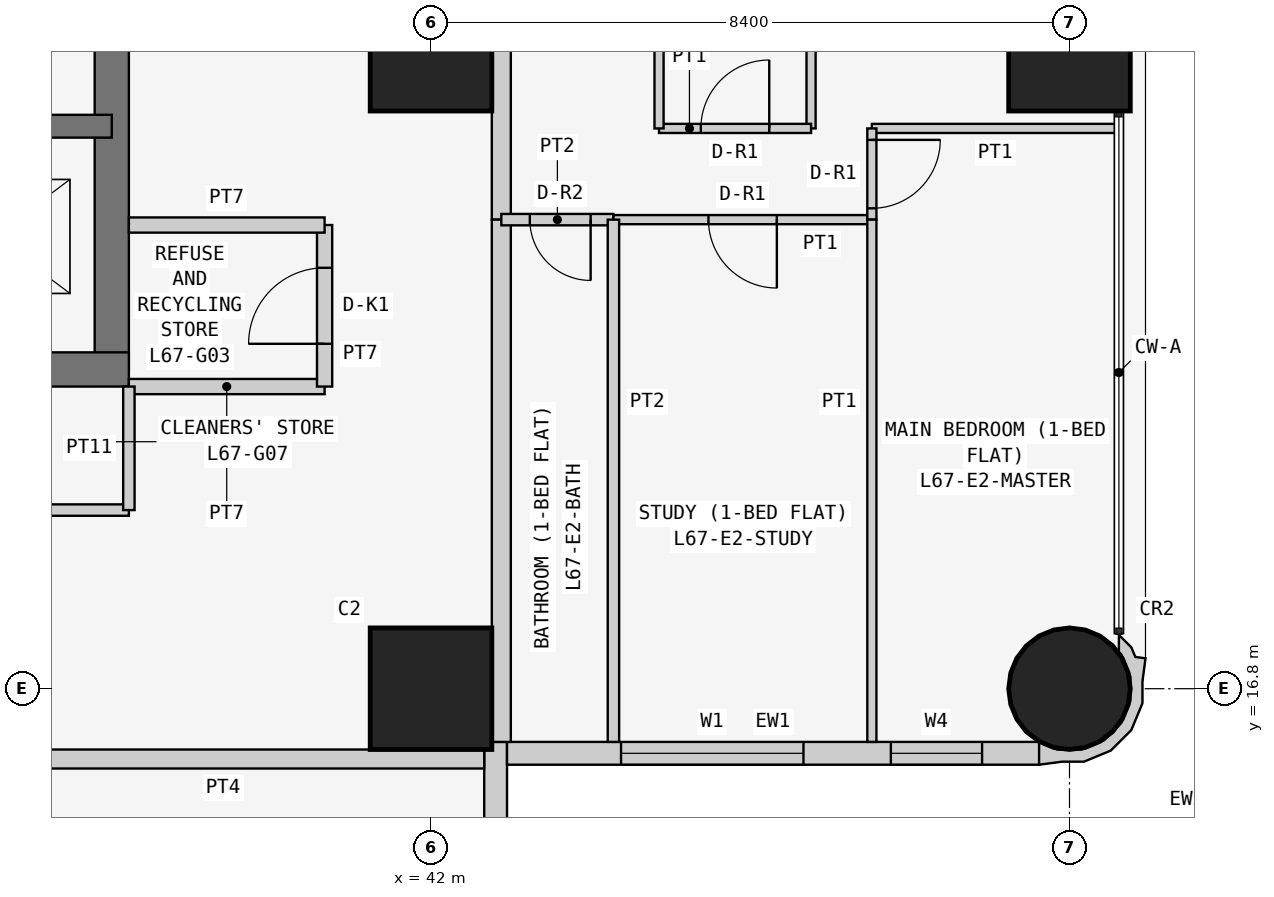
"""IFC4 building model, lengths in metres.
Left out: names, types, materials, properties, quantities, classifications, styles, units other than length and angle.
Written with IfcOpenShell. Run it as: python <this file> out.ifc"""

import sys

from ifc_helpers import new_model, si_unit, direction, frame, frame_2d, origin, origin_2d, place, context, subcontext, project, spatial, polyline, rectangle, circle, outline, extrude, element, fill, save


model = new_model("IFC4")
c1 = context("Model", 3, precision=1e-05, world=origin(), true_north=direction((0.0, 1.0)))
c2 = subcontext(c1, "Body", "Model", "MODEL_VIEW")
j1 = project(units=[si_unit("LENGTHUNIT", "METRE"), si_unit("PLANEANGLEUNIT", "RADIAN")], contexts=[c1])
p1 = place(None, origin())
s1 = spatial("IfcSite", under=j1, at=p1, CompositionType="ELEMENT")
p2 = place(p1, origin())
s2 = spatial("IfcBuilding", under=s1, at=p2, CompositionType="ELEMENT")
p3 = place(p2, frame((0.0, 0.0, 257.7)))
s3 = spatial("IfcBuildingStorey", under=s2, at=p3, CompositionType="ELEMENT", Elevation=257.7)
for number, where, z_axis, x_axis in (
    (1, (42.0, 16.8, 0.0), (0.0, 0.0, 1.0), (1.0, 0.0, 0.0)),
    (2, (42.0, 25.2, 0.0), (0.0, 0.0, 1.0), (1.0, 0.0, 0.0)),
):
    element("IfcColumn", number, at=place(p3, frame(where, z_axis=z_axis, x_axis=x_axis)), inside=s3, PredefinedType="COLUMN", context=c2, shape_type="SweptSolid", body=[
        extrude(rectangle(XDim=1.6, YDim=1.6, at=origin_2d()), origin(), (0.0, 0.0, 1.0), 3.6),
    ])
p4 = place(p3, frame((50.4, 16.8, 0.0), z_axis=(0.0, 0.0, 1.0), x_axis=(1.0, 0.0, 0.0)))
e3 = element("IfcColumn", 3, at=p4, inside=s3, PredefinedType="COLUMN", context=c2, shape_type="SweptSolid", body=[
    extrude(circle(Radius=0.8, at=origin_2d()), origin(), (0.0, 0.0, 1.0), 3.6),
])
p5 = place(p3, frame((50.4, 25.2, 0.0), z_axis=(0.0, 0.0, 1.0), x_axis=(1.0, 0.0, 0.0)))
e4 = element("IfcColumn", 4, at=p5, inside=s3, PredefinedType="COLUMN", context=c2, shape_type="SweptSolid", body=[
    extrude(rectangle(XDim=1.6, YDim=1.6, at=origin_2d()), origin(), (0.0, 0.0, 1.0), 3.6),
])
p6 = place(p3, frame((21.0, 21.0, 0.0), z_axis=(0.0, 0.0, 1.0), x_axis=(1.0, 0.0, 0.0)))
e5 = element("IfcWall", 5, at=p6, inside=s3, PredefinedType="SHEAR", context=c2, shape_type="SweptSolid", body=[
    extrude(rectangle(XDim=17.025, YDim=0.45, at=frame_2d((8.512, 0.0))), origin(), (0.0, 0.0, 1.0), 3.6),
])
p7 = place(p3, frame((37.8, 21.0, 0.0), z_axis=(0.0, 0.0, 1.0), x_axis=(0.0, 1.0, 0.0)))
e6 = element("IfcWall", 6, at=p7, inside=s3, PredefinedType="SHEAR", context=c2, shape_type="SweptSolid", body=[
    extrude(rectangle(XDim=17.025, YDim=0.45, at=frame_2d((8.512, 0.0))), origin(), (0.0, 0.0, 1.0), 3.6),
])
p8 = place(p7, frame((5.2, 0.0, 0.0)))
e7 = element("IfcOpeningElement", 7, at=p8, cuts=e6, PredefinedType="OPENING", context=c2, shape_type="SweptSolid", body=[
    extrude(rectangle(XDim=1.2, YDim=2.1, at=frame_2d((0.6, 1.05))), frame((0.0, 0.235, 0.0), z_axis=(0.0, -1.0, 0.0), x_axis=(1.0, 0.0, 0.0)), (0.0, 0.0, 1.0), 0.47),
])
p9 = place(p3, frame((26.6, 24.2, 0.0), z_axis=(0.0, 0.0, 1.0), x_axis=(1.0, 0.0, 0.0)))
e8 = element("IfcWall", 8, at=p9, inside=s3, PredefinedType="SHEAR", context=c2, shape_type="SweptSolid", body=[
    extrude(rectangle(XDim=11.2, YDim=0.3, at=frame_2d((5.6, 0.0))), origin(), (0.0, 0.0, 1.0), 3.6),
])
p10 = place(p9, frame((0.913, 0.0, 0.0)))
e9 = element("IfcOpeningElement", 9, at=p10, cuts=e8, PredefinedType="OPENING", context=c2, shape_type="SweptSolid", body=[
    extrude(rectangle(XDim=1.0, YDim=2.1, at=frame_2d((0.5, 1.05))), frame((0.0, 0.16, 0.0), z_axis=(0.0, -1.0, 0.0), x_axis=(1.0, 0.0, 0.0)), (0.0, 0.0, 1.0), 0.32),
])
p11 = place(p9, frame((3.7, 0.0, 0.0)))
e10 = element("IfcOpeningElement", 10, at=p11, cuts=e8, PredefinedType="OPENING", context=c2, shape_type="SweptSolid", body=[
    extrude(rectangle(XDim=1.0, YDim=2.1, at=frame_2d((0.5, 1.05))), frame((0.0, 0.16, 0.0), z_axis=(0.0, -1.0, 0.0), x_axis=(1.0, 0.0, 0.0)), (0.0, 0.0, 1.0), 0.32),
])
p12 = place(p9, frame((6.5, 0.0, 0.0)))
e11 = element("IfcOpeningElement", 11, at=p12, cuts=e8, PredefinedType="OPENING", context=c2, shape_type="SweptSolid", body=[
    extrude(rectangle(XDim=1.0, YDim=2.1, at=frame_2d((0.5, 1.05))), frame((0.0, 0.16, 0.0), z_axis=(0.0, -1.0, 0.0), x_axis=(1.0, 0.0, 0.0)), (0.0, 0.0, 1.0), 0.32),
])
p13 = place(p9, frame((9.1, 0.0, 0.0)))
e12 = element("IfcOpeningElement", 12, at=p13, cuts=e8, PredefinedType="OPENING", context=c2, shape_type="SweptSolid", body=[
    extrude(rectangle(XDim=1.1, YDim=2.1, at=frame_2d((0.55, 1.05))), frame((0.0, 0.16, 0.0), z_axis=(0.0, -1.0, 0.0), x_axis=(1.0, 0.0, 0.0)), (0.0, 0.0, 1.0), 0.32),
])
p14 = place(p3, frame((42.85, 8.8, 0.0), z_axis=(0.0, 0.0, 1.0), x_axis=(0.0, 1.0, 0.0)))
e13 = element("IfcWall", 13, at=p14, inside=s3, PredefinedType="SOLIDWALL", context=c2, shape_type="SweptSolid", body=[
    extrude(rectangle(XDim=7.3, YDim=0.3, at=frame_2d((3.65, 0.0))), origin(), (0.0, 0.0, 1.0), 3.45),
])
p15 = place(p14, frame((3.1, 0.0, 0.9)))
e14 = element("IfcOpeningElement", 14, at=p15, cuts=e13, PredefinedType="OPENING", context=c2, shape_type="SweptSolid", body=[
    extrude(rectangle(XDim=2.4, YDim=1.5, at=frame_2d((1.2, 0.75))), frame((0.0, 0.16, 0.0), z_axis=(0.0, -1.0, 0.0), x_axis=(1.0, 0.0, 0.0)), (0.0, 0.0, 1.0), 0.32),
])
p16 = place(p14, frame((0.75, 0.0, 0.9)))
e15 = element("IfcOpeningElement", 15, at=p16, cuts=e13, PredefinedType="OPENING", context=c2, shape_type="SweptSolid", body=[
    extrude(rectangle(XDim=1.2, YDim=1.5, at=frame_2d((0.6, 0.75))), frame((0.0, 0.16, 0.0), z_axis=(0.0, -1.0, 0.0), x_axis=(1.0, 0.0, 0.0)), (0.0, 0.0, 1.0), 0.32),
])
p17 = place(p3, frame((43.0, 15.95, 0.0), z_axis=(0.0, 0.0, 1.0), x_axis=(1.0, 0.0, 0.0)))
e16 = element("IfcWall", 16, at=p17, inside=s3, PredefinedType="SOLIDWALL", context=c2, shape_type="SweptSolid", body=[
    extrude(rectangle(XDim=7.0, YDim=0.3, at=frame_2d((3.5, 0.0))), origin(), (0.0, 0.0, 1.0), 3.45),
])
p18 = place(p17, frame((1.5, 0.0, 0.9)))
e17 = element("IfcOpeningElement", 17, at=p18, cuts=e16, PredefinedType="OPENING", context=c2, shape_type="SweptSolid", body=[
    extrude(rectangle(XDim=2.4, YDim=1.5, at=frame_2d((1.2, 0.75))), frame((0.0, 0.16, 0.0), z_axis=(0.0, -1.0, 0.0), x_axis=(1.0, 0.0, 0.0)), (0.0, 0.0, 1.0), 0.32),
])
p19 = place(p17, frame((5.05, 0.0, 0.9)))
e18 = element("IfcOpeningElement", 18, at=p19, cuts=e16, PredefinedType="OPENING", context=c2, shape_type="SweptSolid", body=[
    extrude(rectangle(XDim=1.2, YDim=1.5, at=frame_2d((0.6, 0.75))), frame((0.0, 0.16, 0.0), z_axis=(0.0, -1.0, 0.0), x_axis=(1.0, 0.0, 0.0)), (0.0, 0.0, 1.0), 0.32),
])
p20 = place(p3, frame((50.073, 15.983, 0.0), z_axis=(0.0, 0.0, 1.0), x_axis=(0.93923434088, -0.343276641956, 0.0)))
e19 = element("IfcWall", 19, at=p20, inside=s3, PredefinedType="SOLIDWALL", context=c2, shape_type="SweptSolid", body=[
    extrude(outline(polyline([(0.828, 1.598), (0.697, 1.569), (0.604, 1.67), (0.394, 1.767), (0.471, 1.556), (0.509, 1.539), (0.724, 1.304), (0.833, 1.005), (0.82, 0.686), (0.686, 0.397), (0.451, 0.182), (0.152, 0.073), (-0.116, 0.084), (-0.128, 0.078), (-0.146, 0.071), (-0.006, -0.197), (0.266, -0.055), (0.535, 0.044), (0.817, 0.302), (0.978, 0.648), (0.994, 1.03), (0.895, 1.3), (0.828, 1.598)])), origin(), (0.0, 0.0, 1.0), 3.45),
])
p21 = place(p3, frame((38.025, 20.775, 0.0), z_axis=(0.0, 0.0, 1.0), x_axis=(1.0, 0.0, 0.0)))
e20 = element("IfcWall", 20, at=p21, inside=s3, PredefinedType="PARTITIONING", context=c2, shape_type="SweptSolid", body=[
    extrude(rectangle(XDim=2.575, YDim=0.2, at=frame_2d((1.288, 0.0))), origin(), (0.0, 0.0, 1.0), 3.45),
])
p22 = place(p3, frame((40.6, 20.775, 0.0), z_axis=(0.0, 0.0, 1.0), x_axis=(0.0, 1.0, 0.0)))
e21 = element("IfcWall", 21, at=p22, inside=s3, PredefinedType="PARTITIONING", context=c2, shape_type="SweptSolid", body=[
    extrude(rectangle(XDim=2.125, YDim=0.2, at=frame_2d((1.062, 0.0))), origin(), (0.0, 0.0, 1.0), 3.45),
])
p23 = place(p22, frame((0.562, 0.0, 0.0)))
e22 = element("IfcOpeningElement", 22, at=p23, cuts=e21, PredefinedType="OPENING", context=c2, shape_type="SweptSolid", body=[
    extrude(rectangle(XDim=1.0, YDim=2.1, at=frame_2d((0.5, 1.05))), frame((0.0, 0.11, 0.0), z_axis=(0.0, -1.0, 0.0), x_axis=(1.0, 0.0, 0.0)), (0.0, 0.0, 1.0), 0.22),
])
p24 = place(p3, frame((40.6, 22.9, 0.0), z_axis=(0.0, 0.0, 1.0), x_axis=(-1.0, 0.0, 0.0)))
e23 = element("IfcWall", 23, at=p24, inside=s3, PredefinedType="PARTITIONING", context=c2, shape_type="SweptSolid", body=[
    extrude(rectangle(XDim=2.575, YDim=0.2, at=frame_2d((1.288, 0.0))), origin(), (0.0, 0.0, 1.0), 3.45),
])
p25 = place(p3, frame((34.7, 19.15, 0.0), z_axis=(0.0, 0.0, 1.0), x_axis=(1.0, 0.0, 0.0)))
e24 = element("IfcWall", 24, at=p25, inside=s3, PredefinedType="PARTITIONING", context=c2, shape_type="SweptSolid", body=[
    extrude(rectangle(XDim=3.325, YDim=0.15, at=frame_2d((1.663, 0.0))), origin(), (0.0, 0.0, 1.0), 3.45),
])
p26 = place(p25, frame((1.163, 0.0, 0.0)))
e25 = element("IfcOpeningElement", 25, at=p26, cuts=e24, PredefinedType="OPENING", context=c2, shape_type="SweptSolid", body=[
    extrude(rectangle(XDim=1.0, YDim=2.1, at=frame_2d((0.5, 1.05))), frame((0.0, 0.085, 0.0), z_axis=(0.0, -1.0, 0.0), x_axis=(1.0, 0.0, 0.0)), (0.0, 0.0, 1.0), 0.17),
])
p27 = place(p3, frame((38.025, 19.15, 0.0), z_axis=(0.0, 0.0, 1.0), x_axis=(0.0, 1.0, 0.0)))
e26 = element("IfcWall", 26, at=p27, inside=s3, PredefinedType="PARTITIONING", context=c2, shape_type="SweptSolid", body=[
    extrude(rectangle(XDim=1.625, YDim=0.15, at=frame_2d((0.812, 0.0))), origin(), (0.0, 0.0, 1.0), 3.45),
])
p28 = place(p3, frame((42.925, 29.4, 0.0), z_axis=(0.0, 0.0, 1.0), x_axis=(0.0, -1.0, 0.0)))
e27 = element("IfcWall", 27, at=p28, inside=s3, PredefinedType="PARTITIONING", context=c2, shape_type="SweptSolid", body=[
    extrude(rectangle(XDim=6.429, YDim=0.25, at=frame_2d((3.214, 0.0))), origin(), (0.0, 0.0, 1.0), 3.45),
])
p29 = place(p28, frame((0.5, 0.0, 0.0)))
e28 = element("IfcOpeningElement", 28, at=p29, cuts=e27, PredefinedType="OPENING", context=c2, shape_type="SweptSolid", body=[
    extrude(rectangle(XDim=1.0, YDim=2.1, at=frame_2d((0.5, 1.05))), frame((0.0, 0.135, 0.0), z_axis=(0.0, -1.0, 0.0), x_axis=(1.0, 0.0, 0.0)), (0.0, 0.0, 1.0), 0.27),
])
for number, where, z_axis, x_axis in (
    (29, (42.925, 22.971, 0.0), (0.0, 0.0, 1.0), (0.0, -1.0, 0.0)),
    (30, (42.7, 15.875, 0.0), (0.0, 0.0, 1.0), (-1.0, 0.0, 0.0)),
):
    element("IfcWall", number, at=place(p3, frame(where, z_axis=z_axis, x_axis=x_axis)), inside=s3, PredefinedType="PARTITIONING", context=c2, shape_type="SweptSolid", body=[
        extrude(rectangle(XDim=6.871, YDim=0.25, at=frame_2d((3.436, 0.0))), origin(), (0.0, 0.0, 1.0), 3.45),
    ])
p30 = place(p3, frame((47.0, 29.4, 0.0), z_axis=(0.0, 0.0, 1.0), x_axis=(0.0, -1.0, 0.0)))
e31 = element("IfcWall", 31, at=p30, inside=s3, PredefinedType="PARTITIONING", context=c2, shape_type="SweptSolid", body=[
    extrude(rectangle(XDim=5.229, YDim=0.12, at=frame_2d((2.615, 0.0))), origin(), (0.0, 0.0, 1.0), 3.45),
])
p31 = place(p3, frame((47.0, 24.171, 0.0), z_axis=(0.0, 0.0, 1.0), x_axis=(-1.0, 0.0, 0.0)))
e32 = element("IfcWall", 32, at=p31, inside=s3, PredefinedType="PARTITIONING", context=c2, shape_type="SweptSolid", body=[
    extrude(rectangle(XDim=2.0, YDim=0.12, at=frame_2d((1.0, 0.0))), origin(), (0.0, 0.0, 1.0), 3.45),
])
p32 = place(p31, frame((0.55, 0.0, 0.0)))
e33 = element("IfcOpeningElement", 33, at=p32, cuts=e32, PredefinedType="OPENING", context=c2, shape_type="SweptSolid", body=[
    extrude(rectangle(XDim=0.9, YDim=2.1, at=frame_2d((0.45, 1.05))), frame((0.0, 0.07, 0.0), z_axis=(0.0, -1.0, 0.0), x_axis=(1.0, 0.0, 0.0)), (0.0, 0.0, 1.0), 0.14),
])
p33 = place(p3, frame((45.0, 24.171, 0.0), z_axis=(0.0, 0.0, 1.0), x_axis=(0.0, 1.0, 0.0)))
e34 = element("IfcWall", 34, at=p33, inside=s3, PredefinedType="PARTITIONING", context=c2, shape_type="SweptSolid", body=[
    extrude(rectangle(XDim=5.229, YDim=0.12, at=frame_2d((2.615, 0.0))), origin(), (0.0, 0.0, 1.0), 3.45),
])
p34 = place(p3, frame((44.4, 22.971, 0.0), z_axis=(0.0, 0.0, 1.0), x_axis=(-1.0, 0.0, 0.0)))
e35 = element("IfcWall", 35, at=p34, inside=s3, PredefinedType="PARTITIONING", context=c2, shape_type="SweptSolid", body=[
    extrude(rectangle(XDim=1.475, YDim=0.15, at=frame_2d((0.737, 0.0))), origin(), (0.0, 0.0, 1.0), 3.45),
])
p35 = place(p34, frame((0.3, 0.0, 0.0)))
e36 = element("IfcOpeningElement", 36, at=p35, cuts=e35, PredefinedType="OPENING", context=c2, shape_type="SweptSolid", body=[
    extrude(rectangle(XDim=0.8, YDim=2.1, at=frame_2d((0.4, 1.05))), frame((0.0, 0.085, 0.0), z_axis=(0.0, -1.0, 0.0), x_axis=(1.0, 0.0, 0.0)), (0.0, 0.0, 1.0), 0.17),
])
p36 = place(p3, frame((47.8, 22.971, 0.0), z_axis=(0.0, 0.0, 1.0), x_axis=(-1.0, 0.0, 0.0)))
e37 = element("IfcWall", 37, at=p36, inside=s3, PredefinedType="PARTITIONING", context=c2, shape_type="SweptSolid", body=[
    extrude(rectangle(XDim=3.4, YDim=0.12, at=frame_2d((1.7, 0.0))), origin(), (0.0, 0.0, 1.0), 3.45),
])
p37 = place(p36, frame((1.25, 0.0, 0.0)))
e38 = element("IfcOpeningElement", 38, at=p37, cuts=e37, PredefinedType="OPENING", context=c2, shape_type="SweptSolid", body=[
    extrude(rectangle(XDim=0.9, YDim=2.1, at=frame_2d((0.45, 1.05))), frame((0.0, 0.07, 0.0), z_axis=(0.0, -1.0, 0.0), x_axis=(1.0, 0.0, 0.0)), (0.0, 0.0, 1.0), 0.14),
])
p38 = place(p3, frame((51.05, 24.171, 0.0), z_axis=(0.0, 0.0, 1.0), x_axis=(-1.0, 0.0, 0.0)))
e39 = element("IfcWall", 39, at=p38, inside=s3, PredefinedType="PARTITIONING", context=c2, shape_type="SweptSolid", body=[
    extrude(rectangle(XDim=3.25, YDim=0.12, at=frame_2d((1.625, 0.0))), origin(), (0.0, 0.0, 1.0), 3.45),
])
p39 = place(p3, frame((47.8, 24.171, 0.0), z_axis=(0.0, 0.0, 1.0), x_axis=(0.0, -1.0, 0.0)))
e40 = element("IfcWall", 40, at=p39, inside=s3, PredefinedType="PARTITIONING", context=c2, shape_type="SweptSolid", body=[
    extrude(rectangle(XDim=1.2, YDim=0.12, at=frame_2d((0.6, 0.0))), origin(), (0.0, 0.0, 1.0), 3.45),
])
p40 = place(p39, frame((0.151, 0.0, 0.0)))
e41 = element("IfcOpeningElement", 41, at=p40, cuts=e40, PredefinedType="OPENING", context=c2, shape_type="SweptSolid", body=[
    extrude(rectangle(XDim=0.9, YDim=2.1, at=frame_2d((0.45, 1.05))), frame((0.0, 0.07, 0.0), z_axis=(0.0, -1.0, 0.0), x_axis=(1.0, 0.0, 0.0)), (0.0, 0.0, 1.0), 0.14),
])
p41 = place(p3, frame((44.4, 22.971, 0.0), z_axis=(0.0, 0.0, 1.0), x_axis=(0.0, -1.0, 0.0)))
e42 = element("IfcWall", 42, at=p41, inside=s3, PredefinedType="PARTITIONING", context=c2, shape_type="SweptSolid", body=[
    extrude(rectangle(XDim=6.871, YDim=0.15, at=frame_2d((3.436, 0.0))), origin(), (0.0, 0.0, 1.0), 3.45),
])
p42 = place(p3, frame((47.8, 22.971, 0.0), z_axis=(0.0, 0.0, 1.0), x_axis=(0.0, -1.0, 0.0)))
e43 = element("IfcWall", 43, at=p42, inside=s3, PredefinedType="PARTITIONING", context=c2, shape_type="SweptSolid", body=[
    extrude(rectangle(XDim=6.871, YDim=0.12, at=frame_2d((3.436, 0.0))), origin(), (0.0, 0.0, 1.0), 3.45),
])
p43 = place(p18, origin())
e44 = element("IfcWindow", 44, at=p43, inside=s3, PartitioningType="SINGLE_PANEL", PredefinedType="WINDOW", context=c2, shape_type="SweptSolid", body=[
    extrude(rectangle(XDim=2.4, YDim=1.5, at=frame_2d((1.2, 0.75))), frame((0.0, 0.03, 0.0), z_axis=(0.0, -1.0, 0.0), x_axis=(1.0, 0.0, 0.0)), (0.0, 0.0, 1.0), 0.06),
])
fill(e17, e44)
p44 = place(p19, origin())
e45 = element("IfcWindow", 45, at=p44, inside=s3, PartitioningType="SINGLE_PANEL", PredefinedType="WINDOW", context=c2, shape_type="SweptSolid", body=[
    extrude(rectangle(XDim=1.2, YDim=1.5, at=frame_2d((0.6, 0.75))), frame((0.0, 0.03, 0.0), z_axis=(0.0, -1.0, 0.0), x_axis=(1.0, 0.0, 0.0)), (0.0, 0.0, 1.0), 0.06),
])
fill(e18, e45)
p45 = place(p23, origin())
e46 = element("IfcDoor", 46, at=p45, inside=s3, OperationType="SINGLE_SWING_LEFT", PredefinedType="DOOR", context=c2, shape_type="SweptSolid", body=[
    extrude(rectangle(XDim=1.0, YDim=2.1, at=frame_2d((0.5, 1.05))), frame((0.0, 0.025, 0.0), z_axis=(0.0, -1.0, 0.0), x_axis=(1.0, 0.0, 0.0)), (0.0, 0.0, 1.0), 0.05),
])
fill(e22, e46)
p46 = place(p32, frame((0.9, 0.0, 0.0), z_axis=(0.0, 0.0, 1.0), x_axis=(-1.0, 0.0, 0.0)))
e47 = element("IfcDoor", 47, at=p46, inside=s3, OperationType="SINGLE_SWING_RIGHT", PredefinedType="DOOR", context=c2, shape_type="SweptSolid", body=[
    extrude(rectangle(XDim=0.9, YDim=2.1, at=frame_2d((0.45, 1.05))), frame((0.0, 0.025, 0.0), z_axis=(0.0, -1.0, 0.0), x_axis=(1.0, 0.0, 0.0)), (0.0, 0.0, 1.0), 0.05),
])
fill(e33, e47)
p47 = place(p35, origin())
e48 = element("IfcDoor", 48, at=p47, inside=s3, OperationType="SINGLE_SWING_LEFT", PredefinedType="DOOR", context=c2, shape_type="SweptSolid", body=[
    extrude(rectangle(XDim=0.8, YDim=2.1, at=frame_2d((0.4, 1.05))), frame((0.0, 0.025, 0.0), z_axis=(0.0, -1.0, 0.0), x_axis=(1.0, 0.0, 0.0)), (0.0, 0.0, 1.0), 0.05),
])
fill(e36, e48)
p48 = place(p37, origin())
e49 = element("IfcDoor", 49, at=p48, inside=s3, OperationType="SINGLE_SWING_LEFT", PredefinedType="DOOR", context=c2, shape_type="SweptSolid", body=[
    extrude(rectangle(XDim=0.9, YDim=2.1, at=frame_2d((0.45, 1.05))), frame((0.0, 0.025, 0.0), z_axis=(0.0, -1.0, 0.0), x_axis=(1.0, 0.0, 0.0)), (0.0, 0.0, 1.0), 0.05),
])
fill(e38, e49)
p49 = place(p40, origin())
e50 = element("IfcDoor", 50, at=p49, inside=s3, OperationType="SINGLE_SWING_LEFT", PredefinedType="DOOR", context=c2, shape_type="SweptSolid", body=[
    extrude(rectangle(XDim=0.9, YDim=2.1, at=frame_2d((0.45, 1.05))), frame((0.0, 0.025, 0.0), z_axis=(0.0, -1.0, 0.0), x_axis=(1.0, 0.0, 0.0)), (0.0, 0.0, 1.0), 0.05),
])
fill(e41, e50)
save(model, sys.argv[1])
